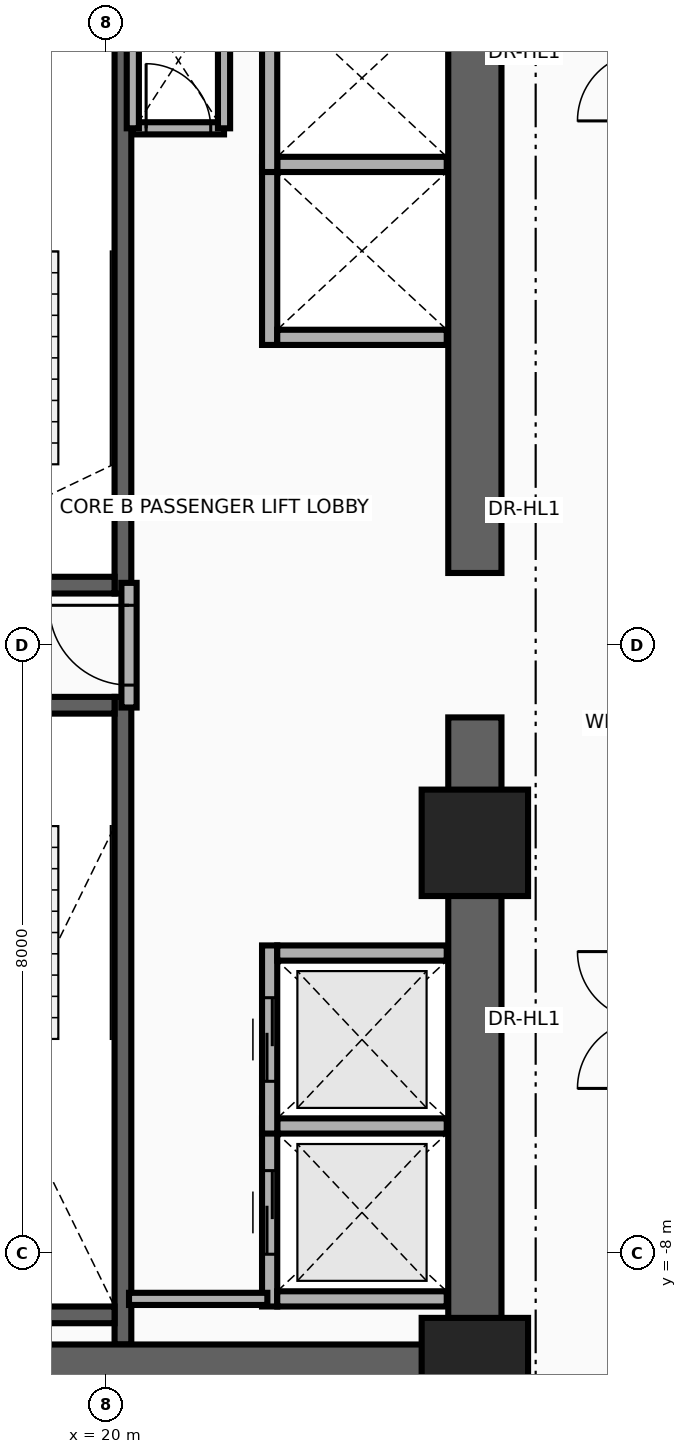
"""IFC4 building model, lengths in metres.
Left out: names, types, materials, properties, quantities, classifications, styles, units other than length and angle.
Written with IfcOpenShell. Run it as: python <this file> out.ifc"""

import sys

from ifc_helpers import new_model, si_unit, direction, frame, frame_2d, origin, origin_2d, place, context, subcontext, project, spatial, rectangle, extrude, source, transform, mapped, element, fill, save


model = new_model("IFC4")
c1 = context("Model", 3, precision=1e-05, world=origin(), true_north=direction((0.0, 1.0)))
c2 = subcontext(c1, "Body", "Model", "MODEL_VIEW")
j1 = project(units=[si_unit("LENGTHUNIT", "METRE"), si_unit("PLANEANGLEUNIT", "RADIAN")], contexts=[c1])
p1 = place(None, origin())
s1 = spatial("IfcSite", under=j1, at=p1, CompositionType="ELEMENT")
p2 = place(p1, origin())
s2 = spatial("IfcBuilding", under=s1, at=p2, CompositionType="ELEMENT")
p3 = place(p2, frame((0.0, 0.0, 88.9)))
s3 = spatial("IfcBuildingStorey", under=s2, at=p3, CompositionType="ELEMENT", Elevation=88.9)
p4 = place(p3, frame((20.22, 0.68, 0.0), z_axis=(0.0, 0.0, 1.0), x_axis=(0.0, 1.0, 0.0)))
e1 = element("IfcWall", 1, at=p4, inside=s3, PredefinedType="SHEAR", context=c2, shape_type="SweptSolid", body=[
    extrude(rectangle(XDim=8.52, YDim=0.22, at=frame_2d((4.26, 0.0))), origin(), (0.0, 0.0, 1.0), 3.46),
])
p5 = place(p3, frame((17.0, 0.79, 0.0), z_axis=(0.0, 0.0, 1.0), x_axis=(1.0, 0.0, 0.0)))
e2 = element("IfcWall", 2, at=p5, inside=s3, PredefinedType="SHEAR", context=c2, shape_type="SweptSolid", body=[
    extrude(rectangle(XDim=3.11, YDim=0.22, at=frame_2d((1.555, 0.0))), origin(), (0.0, 0.0, 1.0), 3.46),
])
p6 = place(p5, frame((0.95, 0.0, 0.0)))
e3 = element("IfcOpeningElement", 3, at=p6, cuts=e2, PredefinedType="OPENING", context=c2, shape_type="SweptSolid", body=[
    extrude(rectangle(XDim=1.1, YDim=2.15, at=frame_2d((0.55, 1.075))), frame((0.0, 0.125, 0.0), z_axis=(0.0, -1.0, 0.0), x_axis=(1.0, 0.0, 0.0)), (0.0, 0.0, 1.0), 0.25),
])
p7 = place(p3, frame((20.22, -9.2, 0.0), z_axis=(0.0, 0.0, 1.0), x_axis=(0.0, 1.0, 0.0)))
e4 = element("IfcWall", 4, at=p7, inside=s3, PredefinedType="SHEAR", context=c2, shape_type="SweptSolid", body=[
    extrude(rectangle(XDim=8.52, YDim=0.22, at=frame_2d((4.26, 0.0))), origin(), (0.0, 0.0, 1.0), 3.46),
])
p8 = place(p3, frame((17.0, -8.81, 0.0), z_axis=(0.0, 0.0, 1.0), x_axis=(1.0, 0.0, 0.0)))
e5 = element("IfcWall", 5, at=p8, inside=s3, PredefinedType="SHEAR", context=c2, shape_type="SweptSolid", body=[
    extrude(rectangle(XDim=3.11, YDim=0.22, at=frame_2d((1.555, 0.0))), origin(), (0.0, 0.0, 1.0), 3.46),
])
p9 = place(p3, frame((17.0, -0.79, 0.0), z_axis=(0.0, 0.0, 1.0), x_axis=(1.0, 0.0, 0.0)))
e6 = element("IfcWall", 6, at=p9, inside=s3, PredefinedType="SHEAR", context=c2, shape_type="SweptSolid", body=[
    extrude(rectangle(XDim=3.11, YDim=0.22, at=frame_2d((1.555, 0.0))), origin(), (0.0, 0.0, 1.0), 3.46),
])
p10 = place(p9, frame((0.95, 0.0, 0.0)))
e7 = element("IfcOpeningElement", 7, at=p10, cuts=e6, PredefinedType="OPENING", context=c2, shape_type="SweptSolid", body=[
    extrude(rectangle(XDim=1.1, YDim=2.15, at=frame_2d((0.55, 1.075))), frame((0.0, 0.125, 0.0), z_axis=(0.0, -1.0, 0.0), x_axis=(1.0, 0.0, 0.0)), (0.0, 0.0, 1.0), 0.25),
])
for number, where, z_axis, x_axis in (
    (8, (24.85, -9.9, 0.0), (0.0, 0.0, 1.0), (0.0, 1.0, 0.0)),
    (9, (24.85, 0.95, 0.0), (0.0, 0.0, 1.0), (0.0, 1.0, 0.0)),
):
    element("IfcWall", number, at=place(p3, frame(where, z_axis=z_axis, x_axis=x_axis)), inside=s3, PredefinedType="SHEAR", context=c2, shape_type="SweptSolid", body=[
        extrude(rectangle(XDim=8.95, YDim=0.7, at=frame_2d((4.475, 0.0))), origin(), (0.0, 0.0, 1.0), 3.46),
    ])
p11 = place(p3, frame((15.85, -9.55, 0.0), z_axis=(0.0, 0.0, 1.0), x_axis=(1.0, 0.0, 0.0)))
e10 = element("IfcWall", 10, at=p11, inside=s3, PredefinedType="SHEAR", context=c2, shape_type="SweptSolid", body=[
    extrude(rectangle(XDim=9.0, YDim=0.7, at=frame_2d((4.5, 0.0))), origin(), (0.0, 0.0, 1.0), 3.46),
])
m1 = source(origin(), c2, "Body", "SweptSolid", [
    extrude(rectangle(XDim=1.4, YDim=1.4, at=origin_2d()), origin(), (0.0, 0.0, 1.0), 3.7),
])
for number, where, z_axis, x_axis in (
    (11, (24.85, -9.55, 0.0), (0.0, 0.0, 1.0), (1.0, 0.0, 0.0)),
    (12, (24.85, -2.6, 0.0), (0.0, 0.0, 1.0), (1.0, 0.0, 0.0)),
):
    element("IfcColumn", number, at=place(p3, frame(where, z_axis=z_axis, x_axis=x_axis)), inside=s3, PredefinedType="COLUMN", context=c2, shape_type="MappedRepresentation", body=[
        mapped(m1, transform((0.0, 0.0, 0.0), x_axis=(1.0, 0.0, 0.0), y_axis=(0.0, 1.0, 0.0), z_axis=(0.0, 0.0, 1.0), scale=1.0)),
    ])
p12 = place(p3, frame((22.15, -8.7, 0.0), z_axis=(0.0, 0.0, 1.0), x_axis=(0.0, 1.0, 0.0)))
e13 = element("IfcWall", 13, at=p12, inside=s3, PredefinedType="MOVABLE", context=c2, shape_type="SweptSolid", body=[
    extrude(rectangle(XDim=2.475, YDim=0.2, at=frame_2d((1.237, 0.0))), origin(), (0.0, 0.0, 1.0), 3.46),
])
p13 = place(p12, frame((0.688, 0.0, 0.0)))
e14 = element("IfcOpeningElement", 14, at=p13, cuts=e13, PredefinedType="OPENING", context=c2, shape_type="SweptSolid", body=[
    extrude(rectangle(XDim=1.1, YDim=2.1, at=frame_2d((0.55, 1.05))), frame((0.0, 0.115, 0.0), z_axis=(0.0, -1.0, 0.0), x_axis=(1.0, 0.0, 0.0)), (0.0, 0.0, 1.0), 0.23),
])
for number, where, z_axis, x_axis in (
    (15, (22.25, -8.6, 0.0), (0.0, 0.0, 1.0), (1.0, 0.0, 0.0)),
    (16, (22.25, -6.325, 0.0), (0.0, 0.0, 1.0), (1.0, 0.0, 0.0)),
):
    element("IfcWall", number, at=place(p3, frame(where, z_axis=z_axis, x_axis=x_axis)), inside=s3, PredefinedType="MOVABLE", context=c2, shape_type="SweptSolid", body=[
        extrude(rectangle(XDim=2.23, YDim=0.2, at=frame_2d((1.115, 0.0))), origin(), (0.0, 0.0, 1.0), 3.46),
    ])
p14 = place(p3, frame((22.15, -6.425, 0.0), z_axis=(0.0, 0.0, 1.0), x_axis=(0.0, 1.0, 0.0)))
e17 = element("IfcWall", 17, at=p14, inside=s3, PredefinedType="MOVABLE", context=c2, shape_type="SweptSolid", body=[
    extrude(rectangle(XDim=2.475, YDim=0.2, at=frame_2d((1.238, 0.0))), origin(), (0.0, 0.0, 1.0), 3.46),
])
p15 = place(p14, frame((0.688, 0.0, 0.0)))
e18 = element("IfcOpeningElement", 18, at=p15, cuts=e17, PredefinedType="OPENING", context=c2, shape_type="SweptSolid", body=[
    extrude(rectangle(XDim=1.1, YDim=2.1, at=frame_2d((0.55, 1.05))), frame((0.0, 0.115, 0.0), z_axis=(0.0, -1.0, 0.0), x_axis=(1.0, 0.0, 0.0)), (0.0, 0.0, 1.0), 0.23),
])
p16 = place(p3, frame((22.25, -4.05, 0.0), z_axis=(0.0, 0.0, 1.0), x_axis=(1.0, 0.0, 0.0)))
e19 = element("IfcWall", 19, at=p16, inside=s3, PredefinedType="MOVABLE", context=c2, shape_type="SweptSolid", body=[
    extrude(rectangle(XDim=2.23, YDim=0.2, at=frame_2d((1.115, 0.0))), origin(), (0.0, 0.0, 1.0), 3.46),
])
p17 = place(p3, frame((22.15, 3.95, 0.0), z_axis=(0.0, 0.0, 1.0), x_axis=(0.0, 1.0, 0.0)))
e20 = element("IfcWall", 20, at=p17, inside=s3, PredefinedType="MOVABLE", context=c2, shape_type="SweptSolid", body=[
    extrude(rectangle(XDim=2.475, YDim=0.2, at=frame_2d((1.238, 0.0))), origin(), (0.0, 0.0, 1.0), 3.46),
])
for number, where, z_axis, x_axis in (
    (21, (22.25, 4.05, 0.0), (0.0, 0.0, 1.0), (1.0, 0.0, 0.0)),
    (22, (22.25, 6.325, 0.0), (0.0, 0.0, 1.0), (1.0, 0.0, 0.0)),
):
    element("IfcWall", number, at=place(p3, frame(where, z_axis=z_axis, x_axis=x_axis)), inside=s3, PredefinedType="MOVABLE", context=c2, shape_type="SweptSolid", body=[
        extrude(rectangle(XDim=2.23, YDim=0.2, at=frame_2d((1.115, 0.0))), origin(), (0.0, 0.0, 1.0), 2.245),
    ])
p18 = place(p3, frame((22.15, 6.225, 0.0), z_axis=(0.0, 0.0, 1.0), x_axis=(0.0, 1.0, 0.0)))
e23 = element("IfcWall", 23, at=p18, inside=s3, PredefinedType="MOVABLE", context=c2, shape_type="SweptSolid", body=[
    extrude(rectangle(XDim=2.475, YDim=0.2, at=frame_2d((1.237, 0.0))), origin(), (0.0, 0.0, 1.0), 3.46),
])
p19 = place(p3, frame((20.3, -0.82, 0.0), z_axis=(0.0, 0.0, 1.0), x_axis=(0.0, 1.0, 0.0)))
e24 = element("IfcWall", 24, at=p19, inside=s3, PredefinedType="PARTITIONING", context=c2, shape_type="SweptSolid", body=[
    extrude(rectangle(XDim=1.64, YDim=0.2, at=frame_2d((0.82, 0.0))), origin(), (0.0, 0.0, 1.0), 3.46),
])
p20 = place(p19, frame((0.295, 0.0, 0.0)))
e25 = element("IfcOpeningElement", 25, at=p20, cuts=e24, PredefinedType="OPENING", context=c2, shape_type="SweptSolid", body=[
    extrude(rectangle(XDim=1.05, YDim=2.15, at=frame_2d((0.525, 1.075))), frame((0.0, 0.115, 0.0), z_axis=(0.0, -1.0, 0.0), x_axis=(1.0, 0.0, 0.0)), (0.0, 0.0, 1.0), 0.23),
])
p21 = place(p3, frame((20.35, 6.8, 0.0), z_axis=(0.0, 0.0, 1.0), x_axis=(1.0, 0.0, 0.0)))
e26 = element("IfcWall", 26, at=p21, inside=s3, PredefinedType="PARTITIONING", context=c2, shape_type="SweptSolid", body=[
    extrude(rectangle(XDim=1.2, YDim=0.16, at=frame_2d((0.6, 0.0))), origin(), (0.0, 0.0, 1.0), 3.46),
])
p22 = place(p21, frame((0.175, 0.0, 0.0)))
e27 = element("IfcOpeningElement", 27, at=p22, cuts=e26, PredefinedType="OPENING", context=c2, shape_type="SweptSolid", body=[
    extrude(rectangle(XDim=0.85, YDim=2.05, at=frame_2d((0.425, 1.025))), frame((0.0, 0.095, 0.0), z_axis=(0.0, -1.0, 0.0), x_axis=(1.0, 0.0, 0.0)), (0.0, 0.0, 1.0), 0.19),
])
for number, where, z_axis, x_axis in (
    (28, (21.55, 6.8, 0.0), (0.0, 0.0, 1.0), (0.0, 1.0, 0.0)),
    (29, (20.35, 6.8, 0.0), (0.0, 0.0, 1.0), (0.0, 1.0, 0.0)),
):
    element("IfcWall", number, at=place(p3, frame(where, z_axis=z_axis, x_axis=x_axis)), inside=s3, PredefinedType="PARTITIONING", context=c2, shape_type="SweptSolid", body=[
        extrude(rectangle(XDim=1.8, YDim=0.16, at=frame_2d((0.9, 0.0))), origin(), (0.0, 0.0, 1.0), 3.46),
    ])
p23 = place(p3, frame((20.3, -8.6, 0.0), z_axis=(0.0, 0.0, 1.0), x_axis=(1.0, 0.0, 0.0)))
e30 = element("IfcWall", 30, at=p23, inside=s3, PredefinedType="PARTITIONING", context=c2, shape_type="SweptSolid", body=[
    extrude(rectangle(XDim=1.82, YDim=0.16, at=frame_2d((0.91, 0.0))), origin(), (0.0, 0.0, 1.0), 3.46),
])
p24 = place(p13, origin())
e31 = element("IfcDoor", 31, at=p24, inside=s3, OperationType="DOUBLE_DOOR_SLIDING", PredefinedType="DOOR", context=c2, shape_type="SweptSolid", body=[
    extrude(rectangle(XDim=1.1, YDim=2.1, at=frame_2d((0.55, 1.05))), frame((0.0, 0.025, 0.0), z_axis=(0.0, -1.0, 0.0), x_axis=(1.0, 0.0, 0.0)), (0.0, 0.0, 1.0), 0.05),
])
fill(e14, e31)
p25 = place(p15, origin())
e32 = element("IfcDoor", 32, at=p25, inside=s3, OperationType="DOUBLE_DOOR_SLIDING", PredefinedType="DOOR", context=c2, shape_type="SweptSolid", body=[
    extrude(rectangle(XDim=1.1, YDim=2.1, at=frame_2d((0.55, 1.05))), frame((0.0, 0.025, 0.0), z_axis=(0.0, -1.0, 0.0), x_axis=(1.0, 0.0, 0.0)), (0.0, 0.0, 1.0), 0.05),
])
fill(e18, e32)
p26 = place(p20, origin())
e33 = element("IfcDoor", 33, at=p26, inside=s3, OperationType="SINGLE_SWING_RIGHT", PredefinedType="DOOR", context=c2, shape_type="SweptSolid", body=[
    extrude(rectangle(XDim=1.05, YDim=2.15, at=frame_2d((0.525, 1.075))), frame((0.0, 0.025, 0.0), z_axis=(0.0, -1.0, 0.0), x_axis=(1.0, 0.0, 0.0)), (0.0, 0.0, 1.0), 0.05),
])
fill(e25, e33)
p27 = place(p22, origin())
e34 = element("IfcDoor", 34, at=p27, inside=s3, OperationType="SINGLE_SWING_LEFT", PredefinedType="DOOR", context=c2, shape_type="SweptSolid", body=[
    extrude(rectangle(XDim=0.85, YDim=2.05, at=frame_2d((0.425, 1.025))), frame((0.0, 0.025, 0.0), z_axis=(0.0, -1.0, 0.0), x_axis=(1.0, 0.0, 0.0)), (0.0, 0.0, 1.0), 0.05),
])
fill(e27, e34)
save(model, sys.argv[1])
